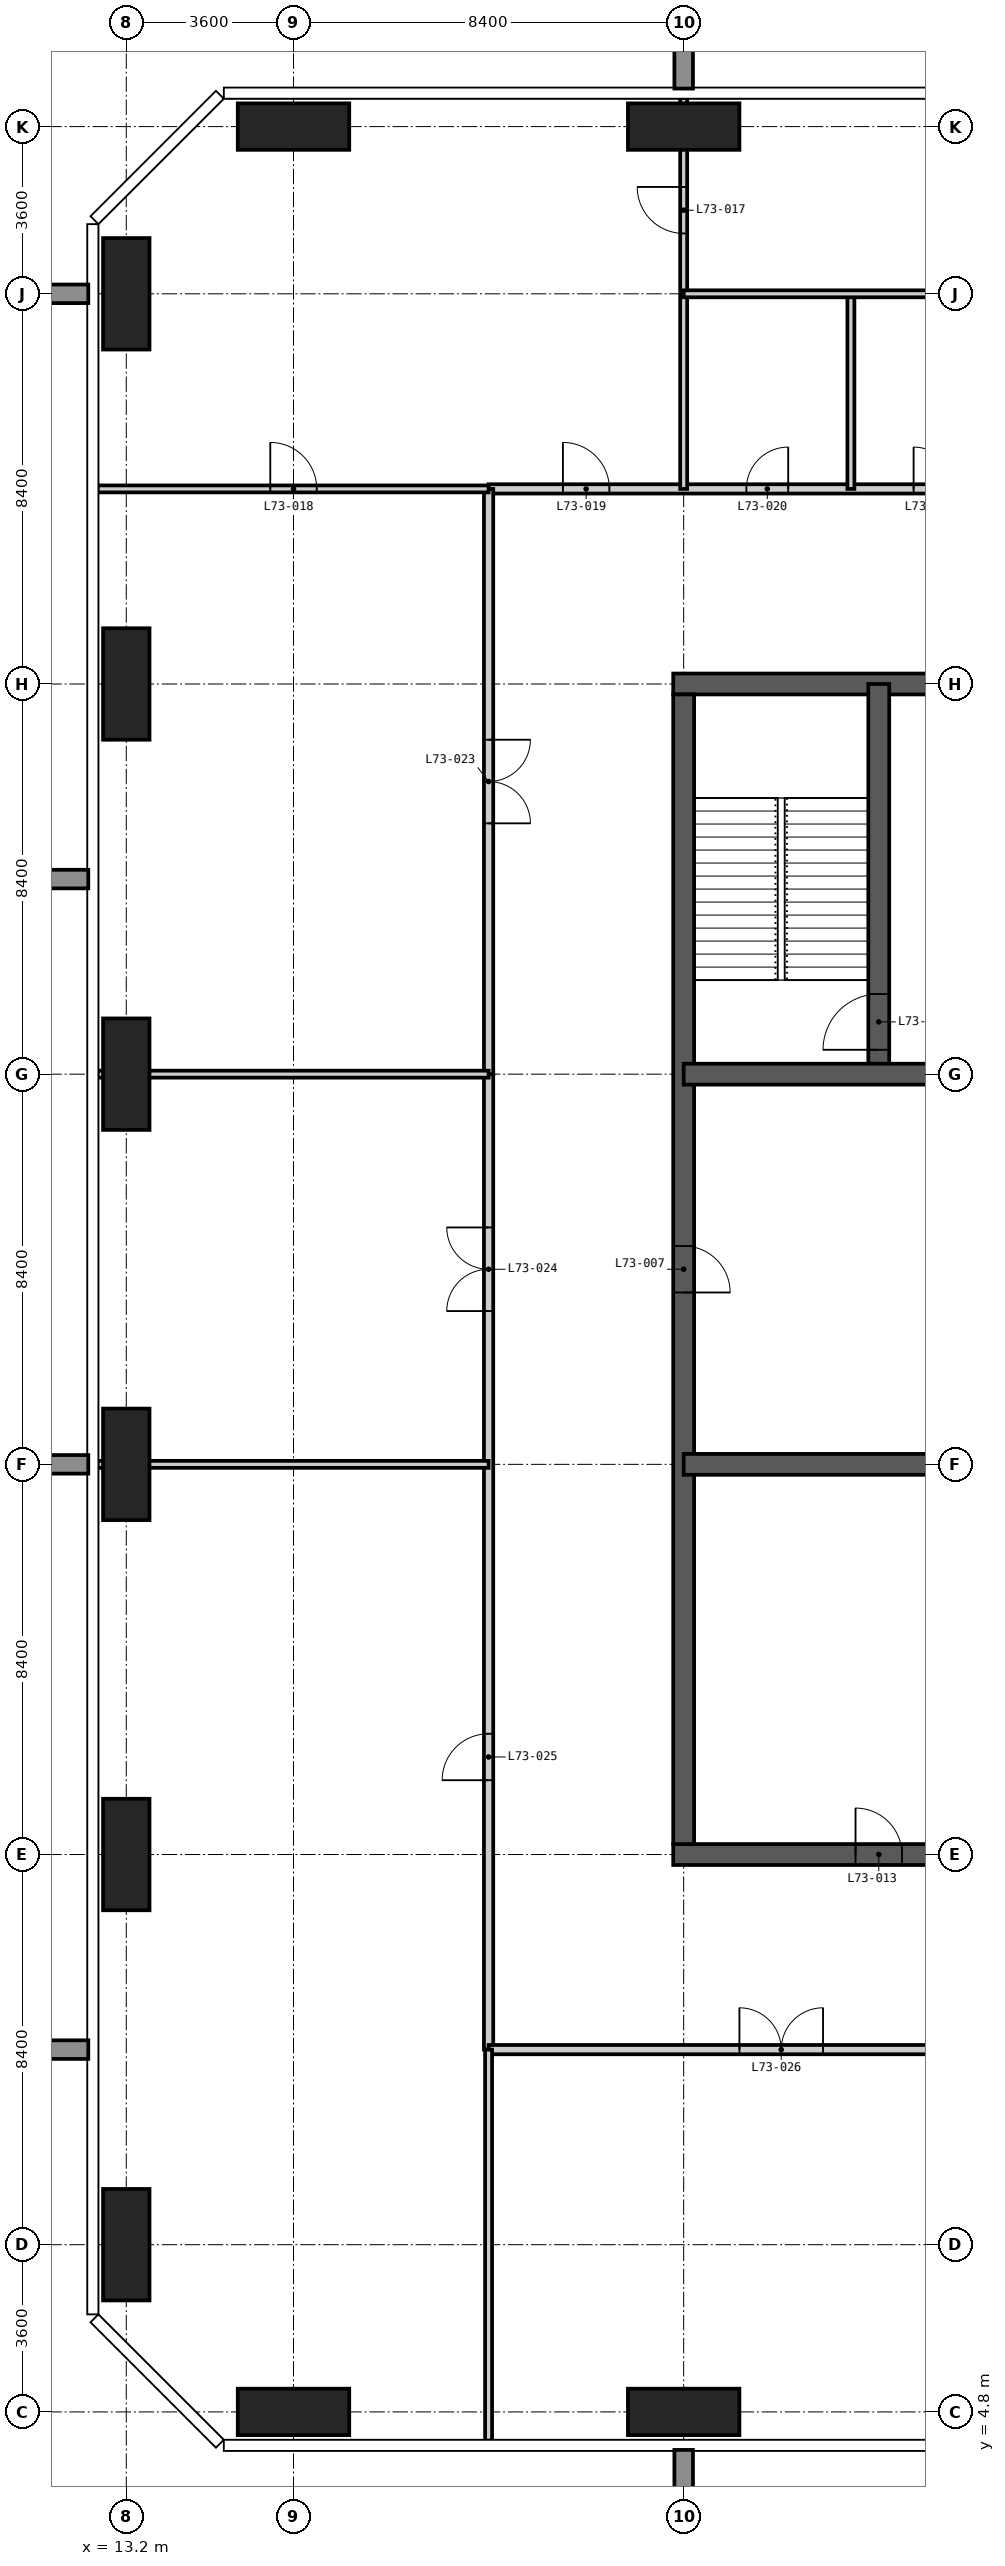
"""IFC4 building model, lengths in metres.
Left out: names, types, materials, properties, quantities, classifications, styles, units other than length and angle.
Written with IfcOpenShell. Run it as: python <this file> out.ifc"""

import sys

from ifc_helpers import new_model, si_unit, direction, frame, frame_2d, origin, origin_2d, place, context, subcontext, project, spatial, rectangle, extrude, element, fill, save


model = new_model("IFC4")
c1 = context("Model", 3, precision=1e-05, world=origin(), true_north=direction((0.0, 1.0)))
c2 = subcontext(c1, "Body", "Model", "MODEL_VIEW")
j1 = project(units=[si_unit("LENGTHUNIT", "METRE"), si_unit("PLANEANGLEUNIT", "RADIAN")], contexts=[c1])
p1 = place(None, origin())
s1 = spatial("IfcSite", under=j1, at=p1, CompositionType="ELEMENT")
p2 = place(p1, origin())
s2 = spatial("IfcBuilding", under=s1, at=p2, CompositionType="ELEMENT")
p3 = place(p2, frame((0.0, 0.0, 284.1)))
s3 = spatial("IfcBuildingStorey", under=s2, at=p3, CompositionType="ELEMENT", Elevation=284.1)
for number, where, z_axis, x_axis in (
    (1, (13.2, 8.4, -0.35), (0.0, 0.0, 1.0), (1.0, 0.0, 0.0)),
    (2, (13.2, 16.8, -0.35), (0.0, 0.0, 1.0), (1.0, 0.0, 0.0)),
    (3, (13.2, 25.2, -0.35), (0.0, 0.0, 1.0), (1.0, 0.0, 0.0)),
    (4, (13.2, 33.6, -0.35), (0.0, 0.0, 1.0), (1.0, 0.0, 0.0)),
    (5, (13.2, 42.0, -0.35), (0.0, 0.0, 1.0), (1.0, 0.0, 0.0)),
    (6, (13.2, 50.4, -0.35), (0.0, 0.0, 1.0), (1.0, 0.0, 0.0)),
):
    element("IfcColumn", number, at=place(p3, frame(where, z_axis=z_axis, x_axis=x_axis)), inside=s3, PredefinedType="COLUMN", context=c2, shape_type="SweptSolid", body=[
        extrude(rectangle(XDim=1.0, YDim=2.4, at=origin_2d()), origin(), (0.0, 0.0, 1.0), 5.0),
    ])
for number, where, z_axis, x_axis in (
    (7, (16.8, 4.8, -0.35), (0.0, 0.0, 1.0), (1.0, 0.0, 0.0)),
    (8, (16.8, 54.0, -0.35), (0.0, 0.0, 1.0), (1.0, 0.0, 0.0)),
    (9, (25.2, 4.8, -0.35), (0.0, 0.0, 1.0), (1.0, 0.0, 0.0)),
    (10, (25.2, 54.0, -0.35), (0.0, 0.0, 1.0), (1.0, 0.0, 0.0)),
):
    element("IfcColumn", number, at=place(p3, frame(where, z_axis=z_axis, x_axis=x_axis)), inside=s3, PredefinedType="COLUMN", context=c2, shape_type="SweptSolid", body=[
        extrude(rectangle(XDim=2.4, YDim=1.0, at=origin_2d()), origin(), (0.0, 0.0, 1.0), 5.0),
    ])
p4 = place(p3, frame((24.975, 16.8, -0.35), z_axis=(0.0, 0.0, 1.0), x_axis=(1.0, 0.0, 0.0)))
e11 = element("IfcWall", 11, at=p4, inside=s3, PredefinedType="SHEAR", context=c2, shape_type="SweptSolid", body=[
    extrude(rectangle(XDim=17.25, YDim=0.45, at=frame_2d((8.625, 0.0))), origin(), (0.0, 0.0, 1.0), 5.0),
])
p5 = place(p4, frame((3.925, 0.0, 0.35)))
e12 = element("IfcOpeningElement", 12, at=p5, cuts=e11, PredefinedType="OPENING", context=c2, shape_type="SweptSolid", body=[
    extrude(rectangle(XDim=1.0, YDim=2.1, at=frame_2d((0.5, 1.05))), frame((0.0, 0.235, 0.0), z_axis=(0.0, -1.0, 0.0), x_axis=(1.0, 0.0, 0.0)), (0.0, 0.0, 1.0), 0.47),
])
p6 = place(p4, frame((10.225, 0.0, 0.35)))
e13 = element("IfcOpeningElement", 13, at=p6, cuts=e11, PredefinedType="OPENING", context=c2, shape_type="SweptSolid", body=[
    extrude(rectangle(XDim=1.0, YDim=2.1, at=frame_2d((0.5, 1.05))), frame((0.0, 0.235, 0.0), z_axis=(0.0, -1.0, 0.0), x_axis=(1.0, 0.0, 0.0)), (0.0, 0.0, 1.0), 0.47),
])
p7 = place(p3, frame((42.225, 42.0, -0.35), z_axis=(0.0, 0.0, 1.0), x_axis=(-1.0, 0.0, 0.0)))
e14 = element("IfcWall", 14, at=p7, inside=s3, PredefinedType="SHEAR", context=c2, shape_type="SweptSolid", body=[
    extrude(rectangle(XDim=17.25, YDim=0.45, at=frame_2d((8.625, 0.0))), origin(), (0.0, 0.0, 1.0), 5.0),
])
p8 = place(p7, frame((10.125, 0.0, 0.35)))
e15 = element("IfcOpeningElement", 15, at=p8, cuts=e14, PredefinedType="OPENING", context=c2, shape_type="SweptSolid", body=[
    extrude(rectangle(XDim=1.2, YDim=2.2, at=frame_2d((0.6, 1.1))), frame((0.0, 0.235, 0.0), z_axis=(0.0, -1.0, 0.0), x_axis=(1.0, 0.0, 0.0)), (0.0, 0.0, 1.0), 0.47),
])
p9 = place(p3, frame((25.2, 41.775, -0.35), z_axis=(0.0, 0.0, 1.0), x_axis=(0.0, -1.0, 0.0)))
e16 = element("IfcWall", 16, at=p9, inside=s3, PredefinedType="SHEAR", context=c2, shape_type="SweptSolid", body=[
    extrude(rectangle(XDim=24.75, YDim=0.45, at=frame_2d((12.375, 0.0))), origin(), (0.0, 0.0, 1.0), 5.0),
])
p10 = place(p9, frame((11.875, 0.0, 0.35)))
e17 = element("IfcOpeningElement", 17, at=p10, cuts=e16, PredefinedType="OPENING", context=c2, shape_type="SweptSolid", body=[
    extrude(rectangle(XDim=1.0, YDim=2.1, at=frame_2d((0.5, 1.05))), frame((0.0, 0.235, 0.0), z_axis=(0.0, -1.0, 0.0), x_axis=(1.0, 0.0, 0.0)), (0.0, 0.0, 1.0), 0.47),
])
p11 = place(p3, frame((29.4, 33.6, -0.35), z_axis=(0.0, 0.0, 1.0), x_axis=(0.0, 1.0, 0.0)))
e18 = element("IfcWall", 18, at=p11, inside=s3, PredefinedType="SHEAR", context=c2, shape_type="SweptSolid", body=[
    extrude(rectangle(XDim=8.4, YDim=0.45, at=frame_2d((4.2, 0.0))), origin(), (0.0, 0.0, 1.0), 5.0),
])
p12 = place(p11, frame((0.525, 0.0, 0.35)))
e19 = element("IfcOpeningElement", 19, at=p12, cuts=e18, PredefinedType="OPENING", context=c2, shape_type="SweptSolid", body=[
    extrude(rectangle(XDim=1.2, YDim=2.2, at=frame_2d((0.6, 1.1))), frame((0.0, 0.235, 0.0), z_axis=(0.0, -1.0, 0.0), x_axis=(1.0, 0.0, 0.0)), (0.0, 0.0, 1.0), 0.47),
])
for number, where, z_axis, x_axis in (
    (20, (25.2, 25.2, -0.35), (0.0, 0.0, 1.0), (1.0, 0.0, 0.0)),
    (21, (25.2, 33.6, -0.35), (0.0, 0.0, 1.0), (1.0, 0.0, 0.0)),
):
    element("IfcWall", number, at=place(p3, frame(where, z_axis=z_axis, x_axis=x_axis)), inside=s3, PredefinedType="SHEAR", context=c2, shape_type="SweptSolid", body=[
        extrude(rectangle(XDim=16.8, YDim=0.45, at=frame_2d((8.4, 0.0))), origin(), (0.0, 0.0, 1.0), 5.0),
    ])
p13 = place(p3, frame((21.0, 12.6, 0.0), z_axis=(0.0, 0.0, 1.0), x_axis=(0.0, 1.0, 0.0)))
e22 = element("IfcWall", 22, at=p13, inside=s3, PredefinedType="PARTITIONING", context=c2, shape_type="SweptSolid", body=[
    extrude(rectangle(XDim=21.0, YDim=0.2, at=frame_2d((10.5, 0.0))), origin(), (0.0, 0.0, 1.0), 4.65),
])
p14 = place(p13, frame((15.9, 0.0, 0.0)))
e23 = element("IfcOpeningElement", 23, at=p14, cuts=e22, PredefinedType="OPENING", context=c2, shape_type="SweptSolid", body=[
    extrude(rectangle(XDim=1.8, YDim=2.4, at=frame_2d((0.9, 1.2))), frame((0.0, 0.11, 0.0), z_axis=(0.0, -1.0, 0.0), x_axis=(1.0, 0.0, 0.0)), (0.0, 0.0, 1.0), 0.22),
])
p15 = place(p13, frame((5.8, 0.0, 0.0)))
e24 = element("IfcOpeningElement", 24, at=p15, cuts=e22, PredefinedType="OPENING", context=c2, shape_type="SweptSolid", body=[
    extrude(rectangle(XDim=1.0, YDim=2.1, at=frame_2d((0.5, 1.05))), frame((0.0, 0.11, 0.0), z_axis=(0.0, -1.0, 0.0), x_axis=(1.0, 0.0, 0.0)), (0.0, 0.0, 1.0), 0.22),
])
p16 = place(p3, frame((21.0, 12.6, 0.0), z_axis=(0.0, 0.0, 1.0), x_axis=(1.0, 0.0, 0.0)))
e25 = element("IfcWall", 25, at=p16, inside=s3, PredefinedType="PARTITIONING", context=c2, shape_type="SweptSolid", body=[
    extrude(rectangle(XDim=25.2, YDim=0.2, at=frame_2d((12.6, 0.0))), origin(), (0.0, 0.0, 1.0), 4.65),
])
p17 = place(p16, frame((5.4, 0.0, 0.0)))
e26 = element("IfcOpeningElement", 26, at=p17, cuts=e25, PredefinedType="OPENING", context=c2, shape_type="SweptSolid", body=[
    extrude(rectangle(XDim=1.8, YDim=2.4, at=frame_2d((0.9, 1.2))), frame((0.0, 0.11, 0.0), z_axis=(0.0, -1.0, 0.0), x_axis=(1.0, 0.0, 0.0)), (0.0, 0.0, 1.0), 0.22),
])
p18 = place(p16, frame((18.4, 0.0, 0.0)))
e27 = element("IfcOpeningElement", 27, at=p18, cuts=e25, PredefinedType="OPENING", context=c2, shape_type="SweptSolid", body=[
    extrude(rectangle(XDim=1.0, YDim=2.1, at=frame_2d((0.5, 1.05))), frame((0.0, 0.11, 0.0), z_axis=(0.0, -1.0, 0.0), x_axis=(1.0, 0.0, 0.0)), (0.0, 0.0, 1.0), 0.22),
])
p19 = place(p3, frame((21.0, 46.2, 0.0), z_axis=(0.0, 0.0, 1.0), x_axis=(1.0, 0.0, 0.0)))
e28 = element("IfcWall", 28, at=p19, inside=s3, PredefinedType="PARTITIONING", context=c2, shape_type="SweptSolid", body=[
    extrude(rectangle(XDim=13.8, YDim=0.2, at=frame_2d((6.9, 0.0))), origin(), (0.0, 0.0, 1.0), 4.65),
])
p20 = place(p19, frame((1.6, 0.0, 0.0)))
e29 = element("IfcOpeningElement", 29, at=p20, cuts=e28, PredefinedType="OPENING", context=c2, shape_type="SweptSolid", body=[
    extrude(rectangle(XDim=1.0, YDim=2.1, at=frame_2d((0.5, 1.05))), frame((0.0, 0.11, 0.0), z_axis=(0.0, -1.0, 0.0), x_axis=(1.0, 0.0, 0.0)), (0.0, 0.0, 1.0), 0.22),
])
p21 = place(p19, frame((5.55, 0.0, 0.0)))
e30 = element("IfcOpeningElement", 30, at=p21, cuts=e28, PredefinedType="OPENING", context=c2, shape_type="SweptSolid", body=[
    extrude(rectangle(XDim=0.9, YDim=2.1, at=frame_2d((0.45, 1.05))), frame((0.0, 0.11, 0.0), z_axis=(0.0, -1.0, 0.0), x_axis=(1.0, 0.0, 0.0)), (0.0, 0.0, 1.0), 0.22),
])
p22 = place(p19, frame((9.15, 0.0, 0.0)))
e31 = element("IfcOpeningElement", 31, at=p22, cuts=e28, PredefinedType="OPENING", context=c2, shape_type="SweptSolid", body=[
    extrude(rectangle(XDim=0.9, YDim=2.1, at=frame_2d((0.45, 1.05))), frame((0.0, 0.11, 0.0), z_axis=(0.0, -1.0, 0.0), x_axis=(1.0, 0.0, 0.0)), (0.0, 0.0, 1.0), 0.22),
])
p23 = place(p19, frame((12.1, 0.0, 0.0)))
e32 = element("IfcOpeningElement", 32, at=p23, cuts=e28, PredefinedType="OPENING", context=c2, shape_type="SweptSolid", body=[
    extrude(rectangle(XDim=1.0, YDim=2.1, at=frame_2d((0.5, 1.05))), frame((0.0, 0.11, 0.0), z_axis=(0.0, -1.0, 0.0), x_axis=(1.0, 0.0, 0.0)), (0.0, 0.0, 1.0), 0.22),
])
p24 = place(p3, frame((21.0, 46.2, 0.0), z_axis=(0.0, 0.0, 1.0), x_axis=(0.0, -1.0, 0.0)))
e33 = element("IfcWall", 33, at=p24, inside=s3, PredefinedType="PARTITIONING", context=c2, shape_type="SweptSolid", body=[
    extrude(rectangle(XDim=12.6, YDim=0.2, at=frame_2d((6.3, 0.0))), origin(), (0.0, 0.0, 1.0), 4.65),
])
p25 = place(p24, frame((5.4, 0.0, 0.0)))
e34 = element("IfcOpeningElement", 34, at=p25, cuts=e33, PredefinedType="OPENING", context=c2, shape_type="SweptSolid", body=[
    extrude(rectangle(XDim=1.8, YDim=2.4, at=frame_2d((0.9, 1.2))), frame((0.0, 0.11, 0.0), z_axis=(0.0, -1.0, 0.0), x_axis=(1.0, 0.0, 0.0)), (0.0, 0.0, 1.0), 0.22),
])
p26 = place(p3, frame((21.0, 4.182, 0.0), z_axis=(0.0, 0.0, 1.0), x_axis=(0.0, 1.0, 0.0)))
e35 = element("IfcWall", 35, at=p26, inside=s3, PredefinedType="PARTITIONING", context=c2, shape_type="SweptSolid", body=[
    extrude(rectangle(XDim=8.418, YDim=0.15, at=frame_2d((4.209, 0.0))), origin(), (0.0, 0.0, 1.0), 4.65),
])
p27 = place(p3, frame((25.2, 46.2, 0.0), z_axis=(0.0, 0.0, 1.0), x_axis=(0.0, 1.0, 0.0)))
e36 = element("IfcWall", 36, at=p27, inside=s3, PredefinedType="PARTITIONING", context=c2, shape_type="SweptSolid", body=[
    extrude(rectangle(XDim=8.418, YDim=0.15, at=frame_2d((4.209, 0.0))), origin(), (0.0, 0.0, 1.0), 4.65),
])
p28 = place(p27, frame((5.5, 0.0, 0.0)))
e37 = element("IfcOpeningElement", 37, at=p28, cuts=e36, PredefinedType="OPENING", context=c2, shape_type="SweptSolid", body=[
    extrude(rectangle(XDim=1.0, YDim=2.1, at=frame_2d((0.5, 1.05))), frame((0.0, 0.085, 0.0), z_axis=(0.0, -1.0, 0.0), x_axis=(1.0, 0.0, 0.0)), (0.0, 0.0, 1.0), 0.17),
])
p29 = place(p3, frame((28.8, 46.2, 0.0), z_axis=(0.0, 0.0, 1.0), x_axis=(0.0, 1.0, 0.0)))
e38 = element("IfcWall", 38, at=p29, inside=s3, PredefinedType="PARTITIONING", context=c2, shape_type="SweptSolid", body=[
    extrude(rectangle(XDim=4.2, YDim=0.15, at=frame_2d((2.1, 0.0))), origin(), (0.0, 0.0, 1.0), 4.65),
])
for number, where, z_axis, x_axis in (
    (39, (12.582, 25.2, 0.0), (0.0, 0.0, 1.0), (1.0, 0.0, 0.0)),
    (40, (12.582, 33.6, 0.0), (0.0, 0.0, 1.0), (1.0, 0.0, 0.0)),
):
    element("IfcWall", number, at=place(p3, frame(where, z_axis=z_axis, x_axis=x_axis)), inside=s3, PredefinedType="PARTITIONING", context=c2, shape_type="SweptSolid", body=[
        extrude(rectangle(XDim=8.418, YDim=0.15, at=frame_2d((4.209, 0.0))), origin(), (0.0, 0.0, 1.0), 4.65),
    ])
p30 = place(p3, frame((12.582, 46.2, 0.0), z_axis=(0.0, 0.0, 1.0), x_axis=(1.0, 0.0, 0.0)))
e41 = element("IfcWall", 41, at=p30, inside=s3, PredefinedType="PARTITIONING", context=c2, shape_type="SweptSolid", body=[
    extrude(rectangle(XDim=8.418, YDim=0.15, at=frame_2d((4.209, 0.0))), origin(), (0.0, 0.0, 1.0), 4.65),
])
p31 = place(p30, frame((3.718, 0.0, 0.0)))
e42 = element("IfcOpeningElement", 42, at=p31, cuts=e41, PredefinedType="OPENING", context=c2, shape_type="SweptSolid", body=[
    extrude(rectangle(XDim=1.0, YDim=2.1, at=frame_2d((0.5, 1.05))), frame((0.0, 0.085, 0.0), z_axis=(0.0, -1.0, 0.0), x_axis=(1.0, 0.0, 0.0)), (0.0, 0.0, 1.0), 0.17),
])
p32 = place(p3, frame((25.2, 50.4, 0.0), z_axis=(0.0, 0.0, 1.0), x_axis=(1.0, 0.0, 0.0)))
e43 = element("IfcWall", 43, at=p32, inside=s3, PredefinedType="PARTITIONING", context=c2, shape_type="SweptSolid", body=[
    extrude(rectangle(XDim=9.6, YDim=0.15, at=frame_2d((4.8, 0.0))), origin(), (0.0, 0.0, 1.0), 4.65),
])
p33 = place(p12, origin())
e44 = element("IfcDoor", 44, at=p33, inside=s3, OperationType="SINGLE_SWING_LEFT", PredefinedType="DOOR", context=c2, shape_type="SweptSolid", body=[
    extrude(rectangle(XDim=1.2, YDim=2.2, at=frame_2d((0.6, 1.1))), frame((0.0, 0.025, 0.0), z_axis=(0.0, -1.0, 0.0), x_axis=(1.0, 0.0, 0.0)), (0.0, 0.0, 1.0), 0.05),
])
fill(e19, e44)
p34 = place(p10, origin())
e45 = element("IfcDoor", 45, at=p34, inside=s3, OperationType="SINGLE_SWING_RIGHT", PredefinedType="DOOR", context=c2, shape_type="SweptSolid", body=[
    extrude(rectangle(XDim=1.0, YDim=2.1, at=frame_2d((0.5, 1.05))), frame((0.0, 0.025, 0.0), z_axis=(0.0, -1.0, 0.0), x_axis=(1.0, 0.0, 0.0)), (0.0, 0.0, 1.0), 0.05),
])
fill(e17, e45)
p35 = place(p5, origin())
e46 = element("IfcDoor", 46, at=p35, inside=s3, OperationType="SINGLE_SWING_LEFT", PredefinedType="DOOR", context=c2, shape_type="SweptSolid", body=[
    extrude(rectangle(XDim=1.0, YDim=2.1, at=frame_2d((0.5, 1.05))), frame((0.0, 0.025, 0.0), z_axis=(0.0, -1.0, 0.0), x_axis=(1.0, 0.0, 0.0)), (0.0, 0.0, 1.0), 0.05),
])
fill(e12, e46)
p36 = place(p28, origin())
e47 = element("IfcDoor", 47, at=p36, inside=s3, OperationType="SINGLE_SWING_RIGHT", PredefinedType="DOOR", context=c2, shape_type="SweptSolid", body=[
    extrude(rectangle(XDim=1.0, YDim=2.1, at=frame_2d((0.5, 1.05))), frame((0.0, 0.025, 0.0), z_axis=(0.0, -1.0, 0.0), x_axis=(1.0, 0.0, 0.0)), (0.0, 0.0, 1.0), 0.05),
])
fill(e37, e47)
p37 = place(p31, origin())
e48 = element("IfcDoor", 48, at=p37, inside=s3, OperationType="SINGLE_SWING_LEFT", PredefinedType="DOOR", context=c2, shape_type="SweptSolid", body=[
    extrude(rectangle(XDim=1.0, YDim=2.1, at=frame_2d((0.5, 1.05))), frame((0.0, 0.025, 0.0), z_axis=(0.0, -1.0, 0.0), x_axis=(1.0, 0.0, 0.0)), (0.0, 0.0, 1.0), 0.05),
])
fill(e42, e48)
p38 = place(p20, origin())
e49 = element("IfcDoor", 49, at=p38, inside=s3, OperationType="SINGLE_SWING_LEFT", PredefinedType="DOOR", context=c2, shape_type="SweptSolid", body=[
    extrude(rectangle(XDim=1.0, YDim=2.1, at=frame_2d((0.5, 1.05))), frame((0.0, 0.025, 0.0), z_axis=(0.0, -1.0, 0.0), x_axis=(1.0, 0.0, 0.0)), (0.0, 0.0, 1.0), 0.05),
])
fill(e29, e49)
p39 = place(p21, origin())
e50 = element("IfcDoor", 50, at=p39, inside=s3, OperationType="SINGLE_SWING_RIGHT", PredefinedType="DOOR", context=c2, shape_type="SweptSolid", body=[
    extrude(rectangle(XDim=0.9, YDim=2.1, at=frame_2d((0.45, 1.05))), frame((0.0, 0.025, 0.0), z_axis=(0.0, -1.0, 0.0), x_axis=(1.0, 0.0, 0.0)), (0.0, 0.0, 1.0), 0.05),
])
fill(e30, e50)
p40 = place(p22, origin())
e51 = element("IfcDoor", 51, at=p40, inside=s3, OperationType="SINGLE_SWING_LEFT", PredefinedType="DOOR", context=c2, shape_type="SweptSolid", body=[
    extrude(rectangle(XDim=0.9, YDim=2.1, at=frame_2d((0.45, 1.05))), frame((0.0, 0.025, 0.0), z_axis=(0.0, -1.0, 0.0), x_axis=(1.0, 0.0, 0.0)), (0.0, 0.0, 1.0), 0.05),
])
fill(e31, e51)
p41 = place(p25, origin())
e52 = element("IfcDoor", 52, at=p41, inside=s3, OperationType="DOUBLE_DOOR_DOUBLE_SWING", PredefinedType="DOOR", context=c2, shape_type="SweptSolid", body=[
    extrude(rectangle(XDim=1.8, YDim=2.4, at=frame_2d((0.9, 1.2))), frame((0.0, 0.025, 0.0), z_axis=(0.0, -1.0, 0.0), x_axis=(1.0, 0.0, 0.0)), (0.0, 0.0, 1.0), 0.05),
])
fill(e34, e52)
p42 = place(p14, origin())
e53 = element("IfcDoor", 53, at=p42, inside=s3, OperationType="DOUBLE_DOOR_DOUBLE_SWING", PredefinedType="DOOR", context=c2, shape_type="SweptSolid", body=[
    extrude(rectangle(XDim=1.8, YDim=2.4, at=frame_2d((0.9, 1.2))), frame((0.0, 0.025, 0.0), z_axis=(0.0, -1.0, 0.0), x_axis=(1.0, 0.0, 0.0)), (0.0, 0.0, 1.0), 0.05),
])
fill(e23, e53)
p43 = place(p15, origin())
e54 = element("IfcDoor", 54, at=p43, inside=s3, OperationType="SINGLE_SWING_LEFT", PredefinedType="DOOR", context=c2, shape_type="SweptSolid", body=[
    extrude(rectangle(XDim=1.0, YDim=2.1, at=frame_2d((0.5, 1.05))), frame((0.0, 0.025, 0.0), z_axis=(0.0, -1.0, 0.0), x_axis=(1.0, 0.0, 0.0)), (0.0, 0.0, 1.0), 0.05),
])
fill(e24, e54)
p44 = place(p17, origin())
e55 = element("IfcDoor", 55, at=p44, inside=s3, OperationType="DOUBLE_DOOR_DOUBLE_SWING", PredefinedType="DOOR", context=c2, shape_type="SweptSolid", body=[
    extrude(rectangle(XDim=1.8, YDim=2.4, at=frame_2d((0.9, 1.2))), frame((0.0, 0.025, 0.0), z_axis=(0.0, -1.0, 0.0), x_axis=(1.0, 0.0, 0.0)), (0.0, 0.0, 1.0), 0.05),
])
fill(e26, e55)
save(model, sys.argv[1])
